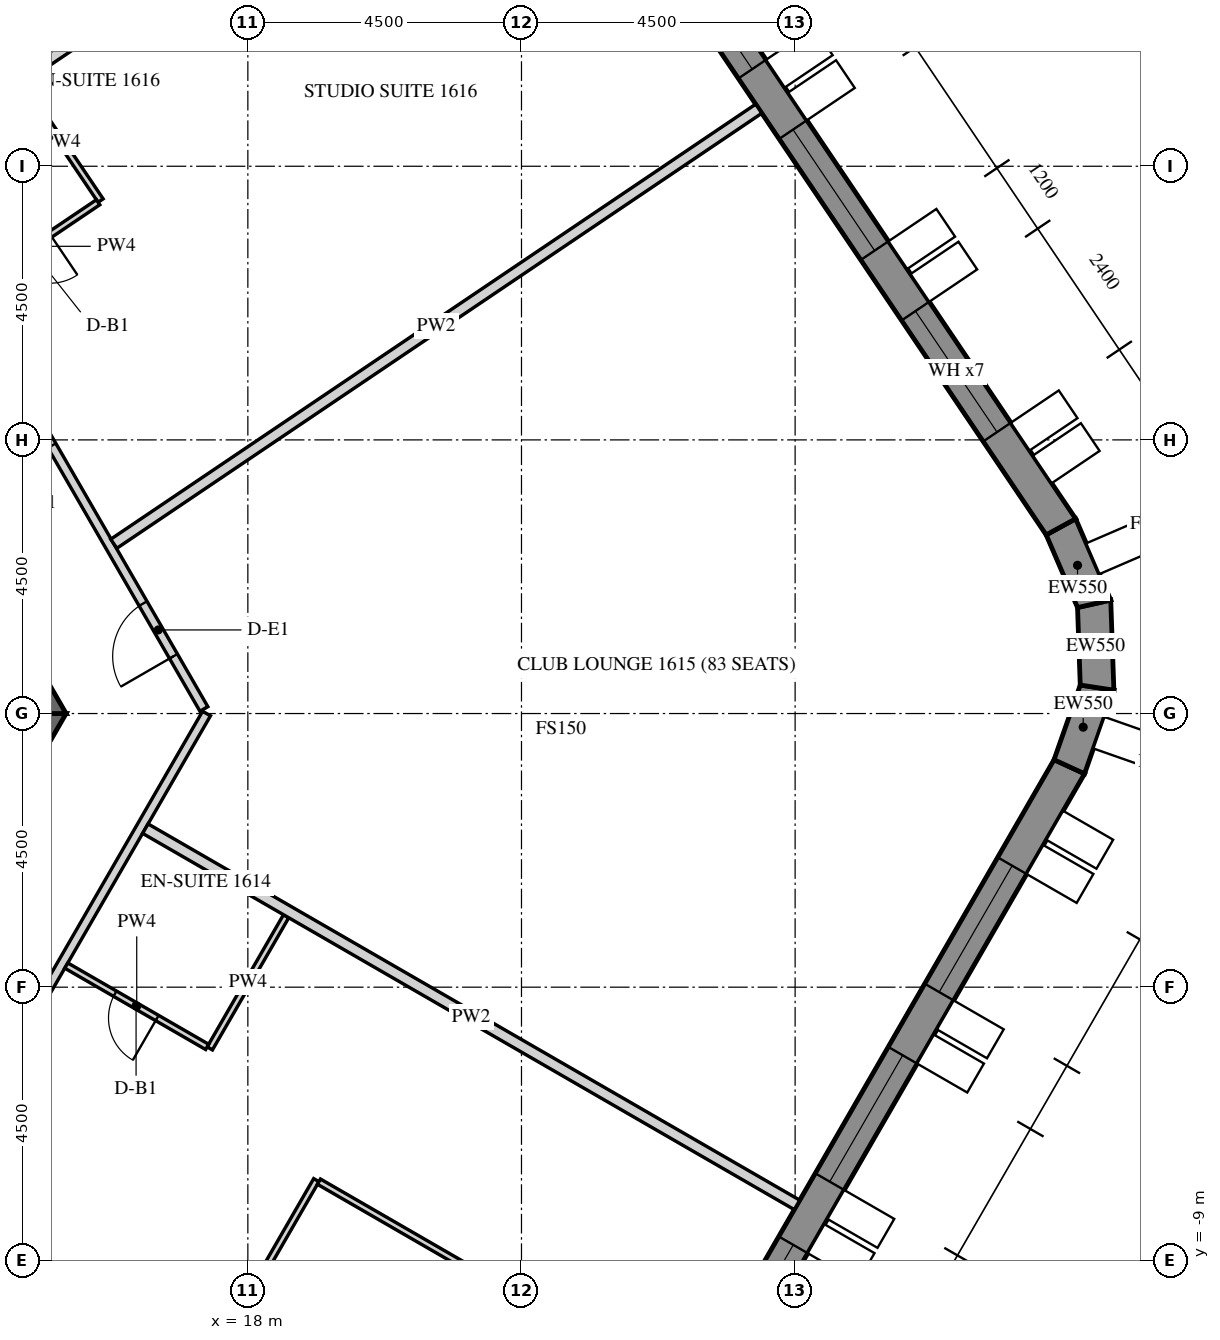
"""IFC4 building model, lengths in metres.
Left out: names, types, materials, properties, quantities, classifications, styles, units other than length and angle.
Written with IfcOpenShell. Run it as: python <this file> out.ifc"""

import sys

from ifc_helpers import new_model, si_unit, direction, frame, frame_2d, origin, place, context, subcontext, project, spatial, polyline, rectangle, outline, extrude, element, fill, save


model = new_model("IFC4")
c1 = context("Model", 3, precision=1e-05, world=origin(), true_north=direction((0.0, 1.0)))
c2 = subcontext(c1, "Body", "Model", "MODEL_VIEW")
j1 = project(units=[si_unit("LENGTHUNIT", "METRE"), si_unit("PLANEANGLEUNIT", "RADIAN")], contexts=[c1])
p1 = place(None, origin())
s1 = spatial("IfcSite", under=j1, at=p1, CompositionType="ELEMENT")
p2 = place(p1, origin())
s2 = spatial("IfcBuilding", under=s1, at=p2, CompositionType="ELEMENT")
p3 = place(p2, frame((0.0, 0.0, 207.3)))
s3 = spatial("IfcBuildingStorey", under=s2, at=p3, CompositionType="ELEMENT", Elevation=207.3)
p4 = place(p3, frame((17.63, -24.914, -0.15), z_axis=(0.0, 0.0, 1.0), x_axis=(0.499998569178, 0.866026229868, 0.0)))
e1 = element("IfcWall", 1, at=p4, inside=s3, PredefinedType="SOLIDWALL", context=c2, shape_type="SweptSolid", body=[
    extrude(outline(polyline([(-0.022, -0.275), (27.783, -0.275), (27.732, 0.275), (0.022, 0.275), (-0.022, -0.275)])), origin(), (0.0, 0.0, 1.0), 3.9),
])
p5 = place(p4, frame((1.879, 0.0, 1.05)))
e2 = element("IfcOpeningElement", 2, at=p5, cuts=e1, PredefinedType="OPENING", context=c2, shape_type="SweptSolid", body=[
    extrude(rectangle(XDim=2.4, YDim=2.4, at=frame_2d((1.2, 1.2))), frame((0.0, 0.285, 0.0), z_axis=(0.0, -1.0, 0.0), x_axis=(1.0, 0.0, 0.0)), (0.0, 0.0, 1.0), 0.57),
])
p6 = place(p4, frame((5.479, 0.0, 1.05)))
e3 = element("IfcOpeningElement", 3, at=p6, cuts=e1, PredefinedType="OPENING", context=c2, shape_type="SweptSolid", body=[
    extrude(rectangle(XDim=2.4, YDim=2.4, at=frame_2d((1.2, 1.2))), frame((0.0, 0.285, 0.0), z_axis=(0.0, -1.0, 0.0), x_axis=(1.0, 0.0, 0.0)), (0.0, 0.0, 1.0), 0.57),
])
p7 = place(p4, frame((9.079, 0.0, 1.05)))
e4 = element("IfcOpeningElement", 4, at=p7, cuts=e1, PredefinedType="OPENING", context=c2, shape_type="SweptSolid", body=[
    extrude(rectangle(XDim=2.4, YDim=2.4, at=frame_2d((1.2, 1.2))), frame((0.0, 0.285, 0.0), z_axis=(0.0, -1.0, 0.0), x_axis=(1.0, 0.0, 0.0)), (0.0, 0.0, 1.0), 0.57),
])
p8 = place(p4, frame((12.679, 0.0, 1.05)))
e5 = element("IfcOpeningElement", 5, at=p8, cuts=e1, PredefinedType="OPENING", context=c2, shape_type="SweptSolid", body=[
    extrude(rectangle(XDim=2.4, YDim=2.4, at=frame_2d((1.2, 1.2))), frame((0.0, 0.285, 0.0), z_axis=(0.0, -1.0, 0.0), x_axis=(1.0, 0.0, 0.0)), (0.0, 0.0, 1.0), 0.57),
])
p9 = place(p4, frame((16.279, 0.0, 1.05)))
e6 = element("IfcOpeningElement", 6, at=p9, cuts=e1, PredefinedType="OPENING", context=c2, shape_type="SweptSolid", body=[
    extrude(rectangle(XDim=2.4, YDim=2.4, at=frame_2d((1.2, 1.2))), frame((0.0, 0.285, 0.0), z_axis=(0.0, -1.0, 0.0), x_axis=(1.0, 0.0, 0.0)), (0.0, 0.0, 1.0), 0.57),
])
p10 = place(p4, frame((19.879, 0.0, 1.05)))
e7 = element("IfcOpeningElement", 7, at=p10, cuts=e1, PredefinedType="OPENING", context=c2, shape_type="SweptSolid", body=[
    extrude(rectangle(XDim=2.4, YDim=2.4, at=frame_2d((1.2, 1.2))), frame((0.0, 0.285, 0.0), z_axis=(0.0, -1.0, 0.0), x_axis=(1.0, 0.0, 0.0)), (0.0, 0.0, 1.0), 0.57),
])
p11 = place(p4, frame((23.479, 0.0, 1.05)))
e8 = element("IfcOpeningElement", 8, at=p11, cuts=e1, PredefinedType="OPENING", context=c2, shape_type="SweptSolid", body=[
    extrude(rectangle(XDim=2.4, YDim=2.4, at=frame_2d((1.2, 1.2))), frame((0.0, 0.285, 0.0), z_axis=(0.0, -1.0, 0.0), x_axis=(1.0, 0.0, 0.0)), (0.0, 0.0, 1.0), 0.57),
])
p12 = place(p3, frame((31.509, -0.875, -0.15), z_axis=(0.0, 0.0, 1.0), x_axis=(0.33111537203, 0.943590276765, 0.0)))
e9 = element("IfcWall", 9, at=p12, inside=s3, PredefinedType="SOLIDWALL", context=c2, shape_type="SweptSolid", body=[
    extrude(outline(polyline([(-0.026, -0.275), (1.431, -0.275), (1.327, 0.275), (0.026, 0.275), (-0.026, -0.275)])), origin(), (0.0, 0.0, 1.0), 3.9),
])
p13 = place(p3, frame((31.966, 0.426, -0.15), z_axis=(0.0, 0.0, 1.0), x_axis=(-0.034876908462, 0.999391615562, 0.0)))
e10 = element("IfcWall", 10, at=p13, inside=s3, PredefinedType="SOLIDWALL", context=c2, shape_type="SweptSolid", body=[
    extrude(outline(polyline([(-0.052, -0.275), (1.431, -0.275), (1.327, 0.275), (0.052, 0.275), (-0.052, -0.275)])), origin(), (0.0, 0.0, 1.0), 3.9),
])
p14 = place(p3, frame((31.917, 1.804, -0.15), z_axis=(0.0, 0.0, 1.0), x_axis=(-0.396225741392, 0.918153125496, 0.0)))
e11 = element("IfcWall", 11, at=p14, inside=s3, PredefinedType="SOLIDWALL", context=c2, shape_type="SweptSolid", body=[
    extrude(outline(polyline([(-0.052, -0.275), (1.405, -0.275), (1.353, 0.275), (0.052, 0.275), (-0.052, -0.275)])), origin(), (0.0, 0.0, 1.0), 3.9),
])
p15 = place(p3, frame((31.371, 3.071, -0.15), z_axis=(0.0, 0.0, 1.0), x_axis=(-0.559189891278, 0.829039604297, 0.0)))
e12 = element("IfcWall", 12, at=p15, inside=s3, PredefinedType="SOLIDWALL", context=c2, shape_type="SweptSolid", body=[
    extrude(outline(polyline([(-0.026, -0.275), (27.781, -0.275), (27.736, 0.275), (0.026, 0.275), (-0.026, -0.275)])), origin(), (0.0, 0.0, 1.0), 3.9),
])
p16 = place(p15, frame((1.879, 0.0, 1.05)))
e13 = element("IfcOpeningElement", 13, at=p16, cuts=e12, PredefinedType="OPENING", context=c2, shape_type="SweptSolid", body=[
    extrude(rectangle(XDim=2.4, YDim=2.4, at=frame_2d((1.2, 1.2))), frame((0.0, 0.285, 0.0), z_axis=(0.0, -1.0, 0.0), x_axis=(1.0, 0.0, 0.0)), (0.0, 0.0, 1.0), 0.57),
])
p17 = place(p15, frame((5.479, 0.0, 1.05)))
e14 = element("IfcOpeningElement", 14, at=p17, cuts=e12, PredefinedType="OPENING", context=c2, shape_type="SweptSolid", body=[
    extrude(rectangle(XDim=2.4, YDim=2.4, at=frame_2d((1.2, 1.2))), frame((0.0, 0.285, 0.0), z_axis=(0.0, -1.0, 0.0), x_axis=(1.0, 0.0, 0.0)), (0.0, 0.0, 1.0), 0.57),
])
p18 = place(p15, frame((9.079, 0.0, 1.05)))
e15 = element("IfcOpeningElement", 15, at=p18, cuts=e12, PredefinedType="OPENING", context=c2, shape_type="SweptSolid", body=[
    extrude(rectangle(XDim=2.4, YDim=2.4, at=frame_2d((1.2, 1.2))), frame((0.0, 0.285, 0.0), z_axis=(0.0, -1.0, 0.0), x_axis=(1.0, 0.0, 0.0)), (0.0, 0.0, 1.0), 0.57),
])
p19 = place(p15, frame((12.679, 0.0, 1.05)))
e16 = element("IfcOpeningElement", 16, at=p19, cuts=e12, PredefinedType="OPENING", context=c2, shape_type="SweptSolid", body=[
    extrude(rectangle(XDim=2.4, YDim=2.4, at=frame_2d((1.2, 1.2))), frame((0.0, 0.285, 0.0), z_axis=(0.0, -1.0, 0.0), x_axis=(1.0, 0.0, 0.0)), (0.0, 0.0, 1.0), 0.57),
])
p20 = place(p15, frame((16.279, 0.0, 1.05)))
e17 = element("IfcOpeningElement", 17, at=p20, cuts=e12, PredefinedType="OPENING", context=c2, shape_type="SweptSolid", body=[
    extrude(rectangle(XDim=2.4, YDim=2.4, at=frame_2d((1.2, 1.2))), frame((0.0, 0.285, 0.0), z_axis=(0.0, -1.0, 0.0), x_axis=(1.0, 0.0, 0.0)), (0.0, 0.0, 1.0), 0.57),
])
p21 = place(p15, frame((19.879, 0.0, 1.05)))
e18 = element("IfcOpeningElement", 18, at=p21, cuts=e12, PredefinedType="OPENING", context=c2, shape_type="SweptSolid", body=[
    extrude(rectangle(XDim=2.4, YDim=2.4, at=frame_2d((1.2, 1.2))), frame((0.0, 0.285, 0.0), z_axis=(0.0, -1.0, 0.0), x_axis=(1.0, 0.0, 0.0)), (0.0, 0.0, 1.0), 0.57),
])
p22 = place(p15, frame((23.479, 0.0, 1.05)))
e19 = element("IfcOpeningElement", 19, at=p22, cuts=e12, PredefinedType="OPENING", context=c2, shape_type="SweptSolid", body=[
    extrude(rectangle(XDim=2.4, YDim=2.4, at=frame_2d((1.2, 1.2))), frame((0.0, 0.285, 0.0), z_axis=(0.0, -1.0, 0.0), x_axis=(1.0, 0.0, 0.0)), (0.0, 0.0, 1.0), 0.57),
])
p23 = place(p3, frame((7.361, -12.75, -0.15), z_axis=(0.0, 0.0, 1.0), x_axis=(0.50000571537, 0.866022103989, 0.0)))
e20 = element("IfcWall", 20, at=p23, inside=s3, PredefinedType="SHEAR", context=c2, shape_type="SweptSolid", body=[
    extrude(outline(polyline([(-0.144, -0.25), (14.867, -0.25), (14.578, 0.25), (0.144, 0.25), (-0.144, -0.25)])), origin(), (0.0, 0.0, 1.0), 3.9),
])
p24 = place(p23, frame((6.49, 0.0, 0.15)))
e21 = element("IfcOpeningElement", 21, at=p24, cuts=e20, PredefinedType="OPENING", context=c2, shape_type="SweptSolid", body=[
    extrude(rectangle(XDim=1.8, YDim=2.4, at=frame_2d((0.9, 1.2))), frame((0.0, 0.26, 0.0), z_axis=(0.0, -1.0, 0.0), x_axis=(1.0, 0.0, 0.0)), (0.0, 0.0, 1.0), 0.52),
])
p25 = place(p3, frame((14.722, 0.0, -0.15), z_axis=(0.0, 0.0, 1.0), x_axis=(-0.50000571537, 0.866022103989, 0.0)))
e22 = element("IfcWall", 22, at=p25, inside=s3, PredefinedType="SHEAR", context=c2, shape_type="SweptSolid", body=[
    extrude(outline(polyline([(-0.144, -0.25), (14.867, -0.25), (14.578, 0.25), (0.144, 0.25), (-0.144, -0.25)])), origin(), (0.0, 0.0, 1.0), 3.9),
])
p26 = place(p25, frame((6.432, 0.0, 0.15)))
e23 = element("IfcOpeningElement", 23, at=p26, cuts=e22, PredefinedType="OPENING", context=c2, shape_type="SweptSolid", body=[
    extrude(rectangle(XDim=1.8, YDim=2.4, at=frame_2d((0.9, 1.2))), frame((0.0, 0.26, 0.0), z_axis=(0.0, -1.0, 0.0), x_axis=(1.0, 0.0, 0.0)), (0.0, 0.0, 1.0), 0.52),
])
p27 = place(p3, frame((10.887, -11.144, 0.0), z_axis=(0.0, 0.0, 1.0), x_axis=(0.500006037985, 0.866021917724, 0.0)))
e24 = element("IfcWall", 24, at=p27, inside=s3, PredefinedType="PARTITIONING", context=c2, shape_type="SweptSolid", body=[
    extrude(rectangle(XDim=12.867, YDim=0.15, at=frame_2d((6.434, 0.0))), origin(), (0.0, 0.0, 1.0), 2.988),
])
p28 = place(p27, frame((3.525, 0.0, 0.0)))
e25 = element("IfcOpeningElement", 25, at=p28, cuts=e24, PredefinedType="OPENING", context=c2, shape_type="SweptSolid", body=[
    extrude(rectangle(XDim=1.0, YDim=2.1, at=frame_2d((0.5, 1.05))), frame((0.0, 0.085, 0.0), z_axis=(0.0, -1.0, 0.0), x_axis=(1.0, 0.0, 0.0)), (0.0, 0.0, 1.0), 0.17),
])
p29 = place(p3, frame((17.277, 0.075, 0.0), z_axis=(0.0, 0.0, 1.0), x_axis=(-0.499988884089, 0.866031821464, 0.0)))
e26 = element("IfcWall", 26, at=p29, inside=s3, PredefinedType="PARTITIONING", context=c2, shape_type="SweptSolid", body=[
    extrude(rectangle(XDim=14.78, YDim=0.15, at=frame_2d((7.39, 0.0))), origin(), (0.0, 0.0, 1.0), 2.988),
])
p30 = place(p29, frame((1.001, 0.0, 0.0)))
e27 = element("IfcOpeningElement", 27, at=p30, cuts=e26, PredefinedType="OPENING", context=c2, shape_type="SweptSolid", body=[
    extrude(rectangle(XDim=1.0, YDim=2.1, at=frame_2d((0.5, 1.05))), frame((0.0, 0.085, 0.0), z_axis=(0.0, -1.0, 0.0), x_axis=(1.0, 0.0, 0.0)), (0.0, 0.0, 1.0), 0.17),
])
p31 = place(p29, frame((5.0, 0.0, 0.0)))
e28 = element("IfcOpeningElement", 28, at=p31, cuts=e26, PredefinedType="OPENING", context=c2, shape_type="SweptSolid", body=[
    extrude(rectangle(XDim=1.0, YDim=2.1, at=frame_2d((0.5, 1.05))), frame((0.0, 0.085, 0.0), z_axis=(0.0, -1.0, 0.0), x_axis=(1.0, 0.0, 0.0)), (0.0, 0.0, 1.0), 0.17),
])
p32 = place(p29, frame((10.79, 0.0, 0.0)))
e29 = element("IfcOpeningElement", 29, at=p32, cuts=e26, PredefinedType="OPENING", context=c2, shape_type="SweptSolid", body=[
    extrude(rectangle(XDim=1.0, YDim=2.1, at=frame_2d((0.5, 1.05))), frame((0.0, 0.085, 0.0), z_axis=(0.0, -1.0, 0.0), x_axis=(1.0, 0.0, 0.0)), (0.0, 0.0, 1.0), 0.17),
])
p33 = place(p3, frame((18.629, -3.333, 0.0), z_axis=(0.0, 0.0, 1.0), x_axis=(-0.499946979623, -0.86605601295, 0.0)))
e30 = element("IfcWall", 30, at=p33, inside=s3, PredefinedType="PARTITIONING", context=c2, shape_type="SweptSolid", body=[
    extrude(rectangle(XDim=2.51, YDim=0.1, at=frame_2d((1.255, 0.0))), origin(), (0.0, 0.0, 1.0), 2.988),
])
p34 = place(p3, frame((17.331, -5.482, 0.0), z_axis=(0.0, 0.0, 1.0), x_axis=(-0.86604424267, 0.499967368674, 0.0)))
e31 = element("IfcWall", 31, at=p34, inside=s3, PredefinedType="PARTITIONING", context=c2, shape_type="SweptSolid", body=[
    extrude(rectangle(XDim=2.675, YDim=0.1, at=frame_2d((1.337, 0.0))), origin(), (0.0, 0.0, 1.0), 2.988),
])
p35 = place(p34, frame((0.95, 0.0, 0.0)))
e32 = element("IfcOpeningElement", 32, at=p35, cuts=e31, PredefinedType="OPENING", context=c2, shape_type="SweptSolid", body=[
    extrude(rectangle(XDim=0.8, YDim=2.1, at=frame_2d((0.4, 1.05))), frame((0.0, 0.06, 0.0), z_axis=(0.0, -1.0, 0.0), x_axis=(1.0, 0.0, 0.0)), (0.0, 0.0, 1.0), 0.12),
])
p36 = place(p3, frame((15.571, -13.831, 0.0), z_axis=(0.0, 0.0, 1.0), x_axis=(0.5000167099, 0.866015756104, 0.0)))
e33 = element("IfcWall", 33, at=p36, inside=s3, PredefinedType="PARTITIONING", context=c2, shape_type="SweptSolid", body=[
    extrude(rectangle(XDim=7.11, YDim=0.1, at=frame_2d((3.555, 0.0))), origin(), (0.0, 0.0, 1.0), 2.988),
])
p37 = place(p36, frame((3.06, 0.0, 0.0)))
e34 = element("IfcOpeningElement", 34, at=p37, cuts=e33, PredefinedType="OPENING", context=c2, shape_type="SweptSolid", body=[
    extrude(rectangle(XDim=0.9, YDim=2.1, at=frame_2d((0.45, 1.05))), frame((0.0, 0.06, 0.0), z_axis=(0.0, -1.0, 0.0), x_axis=(1.0, 0.0, 0.0)), (0.0, 0.0, 1.0), 0.12),
])
p38 = place(p3, frame((19.169, -7.698, 0.0), z_axis=(0.0, 0.0, 1.0), x_axis=(0.866028190633, -0.499995173006, 0.0)))
e35 = element("IfcWall", 35, at=p38, inside=s3, PredefinedType="PARTITIONING", context=c2, shape_type="SweptSolid", body=[
    extrude(rectangle(XDim=7.0, YDim=0.1, at=frame_2d((3.5, 0.0))), origin(), (0.0, 0.0, 1.0), 2.988),
])
p39 = place(p3, frame((27.031, -8.08, 0.0), z_axis=(0.0, 0.0, 1.0), x_axis=(-0.866024931941, 0.500000817256, 0.0)))
e36 = element("IfcWall", 36, at=p39, inside=s3, PredefinedType="PARTITIONING", context=c2, shape_type="SweptSolid", body=[
    extrude(rectangle(XDim=12.375, YDim=0.18, at=frame_2d((6.188, 0.0))), origin(), (0.0, 0.0, 1.0), 2.988),
])
p40 = place(p3, frame((26.402, 9.946, 0.0), z_axis=(0.0, 0.0, 1.0), x_axis=(-0.829037771727, -0.559192608187, 0.0)))
e37 = element("IfcWall", 37, at=p40, inside=s3, PredefinedType="PARTITIONING", context=c2, shape_type="SweptSolid", body=[
    extrude(rectangle(XDim=12.794, YDim=0.18, at=frame_2d((6.397, 0.0))), origin(), (0.0, 0.0, 1.0), 2.988),
])
p41 = place(p3, frame((14.287, 10.351, 0.0), z_axis=(0.0, 0.0, 1.0), x_axis=(0.559204176839, -0.829029968461, 0.0)))
e38 = element("IfcWall", 38, at=p41, inside=s3, PredefinedType="PARTITIONING", context=c2, shape_type="SweptSolid", body=[
    extrude(rectangle(XDim=2.31, YDim=0.1, at=frame_2d((1.155, 0.0))), origin(), (0.0, 0.0, 1.0), 2.988),
])
p42 = place(p3, frame((15.537, 8.408, 0.0), z_axis=(0.0, 0.0, 1.0), x_axis=(-0.829051810631, -0.559171794076, 0.0)))
e39 = element("IfcWall", 39, at=p42, inside=s3, PredefinedType="PARTITIONING", context=c2, shape_type="SweptSolid", body=[
    extrude(rectangle(XDim=2.591, YDim=0.1, at=frame_2d((1.295, 0.0))), origin(), (0.0, 0.0, 1.0), 2.988),
])
p43 = place(p42, frame((0.95, 0.0, 0.0)))
e40 = element("IfcOpeningElement", 40, at=p43, cuts=e39, PredefinedType="OPENING", context=c2, shape_type="SweptSolid", body=[
    extrude(rectangle(XDim=0.8, YDim=2.1, at=frame_2d((0.4, 1.05))), frame((0.0, 0.06, 0.0), z_axis=(0.0, -1.0, 0.0), x_axis=(1.0, 0.0, 0.0)), (0.0, 0.0, 1.0), 0.12),
])
p44 = place(p3, frame((22.376, 15.915, 0.0), z_axis=(0.0, 0.0, 1.0), x_axis=(-0.829034008237, -0.559198187753, 0.0)))
e41 = element("IfcWall", 41, at=p44, inside=s3, PredefinedType="PARTITIONING", context=c2, shape_type="SweptSolid", body=[
    extrude(rectangle(XDim=12.291, YDim=0.18, at=frame_2d((6.145, 0.0))), origin(), (0.0, 0.0, 1.0), 2.988),
])
p45 = place(p9, frame((0.0, 0.205, 0.0)))
e42 = element("IfcWindow", 42, at=p45, inside=s3, PartitioningType="DOUBLE_PANEL_VERTICAL", PredefinedType="WINDOW", context=c2, shape_type="SweptSolid", body=[
    extrude(rectangle(XDim=2.4, YDim=2.4, at=frame_2d((1.2, 1.2))), frame((0.0, 0.03, 0.0), z_axis=(0.0, -1.0, 0.0), x_axis=(1.0, 0.0, 0.0)), (0.0, 0.0, 1.0), 0.06),
])
fill(e6, e42)
p46 = place(p10, frame((0.0, 0.205, 0.0)))
e43 = element("IfcWindow", 43, at=p46, inside=s3, PartitioningType="DOUBLE_PANEL_VERTICAL", PredefinedType="WINDOW", context=c2, shape_type="SweptSolid", body=[
    extrude(rectangle(XDim=2.4, YDim=2.4, at=frame_2d((1.2, 1.2))), frame((0.0, 0.03, 0.0), z_axis=(0.0, -1.0, 0.0), x_axis=(1.0, 0.0, 0.0)), (0.0, 0.0, 1.0), 0.06),
])
fill(e7, e43)
p47 = place(p11, frame((0.0, 0.205, 0.0)))
e44 = element("IfcWindow", 44, at=p47, inside=s3, PartitioningType="DOUBLE_PANEL_VERTICAL", PredefinedType="WINDOW", context=c2, shape_type="SweptSolid", body=[
    extrude(rectangle(XDim=2.4, YDim=2.4, at=frame_2d((1.2, 1.2))), frame((0.0, 0.03, 0.0), z_axis=(0.0, -1.0, 0.0), x_axis=(1.0, 0.0, 0.0)), (0.0, 0.0, 1.0), 0.06),
])
fill(e8, e44)
p48 = place(p16, frame((0.0, 0.205, 0.0)))
e45 = element("IfcWindow", 45, at=p48, inside=s3, PartitioningType="DOUBLE_PANEL_VERTICAL", PredefinedType="WINDOW", context=c2, shape_type="SweptSolid", body=[
    extrude(rectangle(XDim=2.4, YDim=2.4, at=frame_2d((1.2, 1.2))), frame((0.0, 0.03, 0.0), z_axis=(0.0, -1.0, 0.0), x_axis=(1.0, 0.0, 0.0)), (0.0, 0.0, 1.0), 0.06),
])
fill(e13, e45)
p49 = place(p17, frame((0.0, 0.205, 0.0)))
e46 = element("IfcWindow", 46, at=p49, inside=s3, PartitioningType="DOUBLE_PANEL_VERTICAL", PredefinedType="WINDOW", context=c2, shape_type="SweptSolid", body=[
    extrude(rectangle(XDim=2.4, YDim=2.4, at=frame_2d((1.2, 1.2))), frame((0.0, 0.03, 0.0), z_axis=(0.0, -1.0, 0.0), x_axis=(1.0, 0.0, 0.0)), (0.0, 0.0, 1.0), 0.06),
])
fill(e14, e46)
p50 = place(p18, frame((0.0, 0.205, 0.0)))
e47 = element("IfcWindow", 47, at=p50, inside=s3, PartitioningType="DOUBLE_PANEL_VERTICAL", PredefinedType="WINDOW", context=c2, shape_type="SweptSolid", body=[
    extrude(rectangle(XDim=2.4, YDim=2.4, at=frame_2d((1.2, 1.2))), frame((0.0, 0.03, 0.0), z_axis=(0.0, -1.0, 0.0), x_axis=(1.0, 0.0, 0.0)), (0.0, 0.0, 1.0), 0.06),
])
fill(e15, e47)
p51 = place(p35, origin())
e48 = element("IfcDoor", 48, at=p51, inside=s3, OperationType="SINGLE_SWING_LEFT", PredefinedType="DOOR", context=c2, shape_type="SweptSolid", body=[
    extrude(rectangle(XDim=0.8, YDim=2.1, at=frame_2d((0.4, 1.05))), frame((0.0, 0.025, 0.0), z_axis=(0.0, -1.0, 0.0), x_axis=(1.0, 0.0, 0.0)), (0.0, 0.0, 1.0), 0.05),
])
fill(e32, e48)
p52 = place(p30, origin())
e49 = element("IfcDoor", 49, at=p52, inside=s3, OperationType="SINGLE_SWING_RIGHT", PredefinedType="DOOR", context=c2, shape_type="SweptSolid", body=[
    extrude(rectangle(XDim=1.0, YDim=2.1, at=frame_2d((0.5, 1.05))), frame((0.0, 0.025, 0.0), z_axis=(0.0, -1.0, 0.0), x_axis=(1.0, 0.0, 0.0)), (0.0, 0.0, 1.0), 0.05),
])
fill(e27, e49)
p53 = place(p31, origin())
e50 = element("IfcDoor", 50, at=p53, inside=s3, OperationType="SINGLE_SWING_LEFT", PredefinedType="DOOR", context=c2, shape_type="SweptSolid", body=[
    extrude(rectangle(XDim=1.0, YDim=2.1, at=frame_2d((0.5, 1.05))), frame((0.0, 0.025, 0.0), z_axis=(0.0, -1.0, 0.0), x_axis=(1.0, 0.0, 0.0)), (0.0, 0.0, 1.0), 0.05),
])
fill(e28, e50)
save(model, sys.argv[1])
